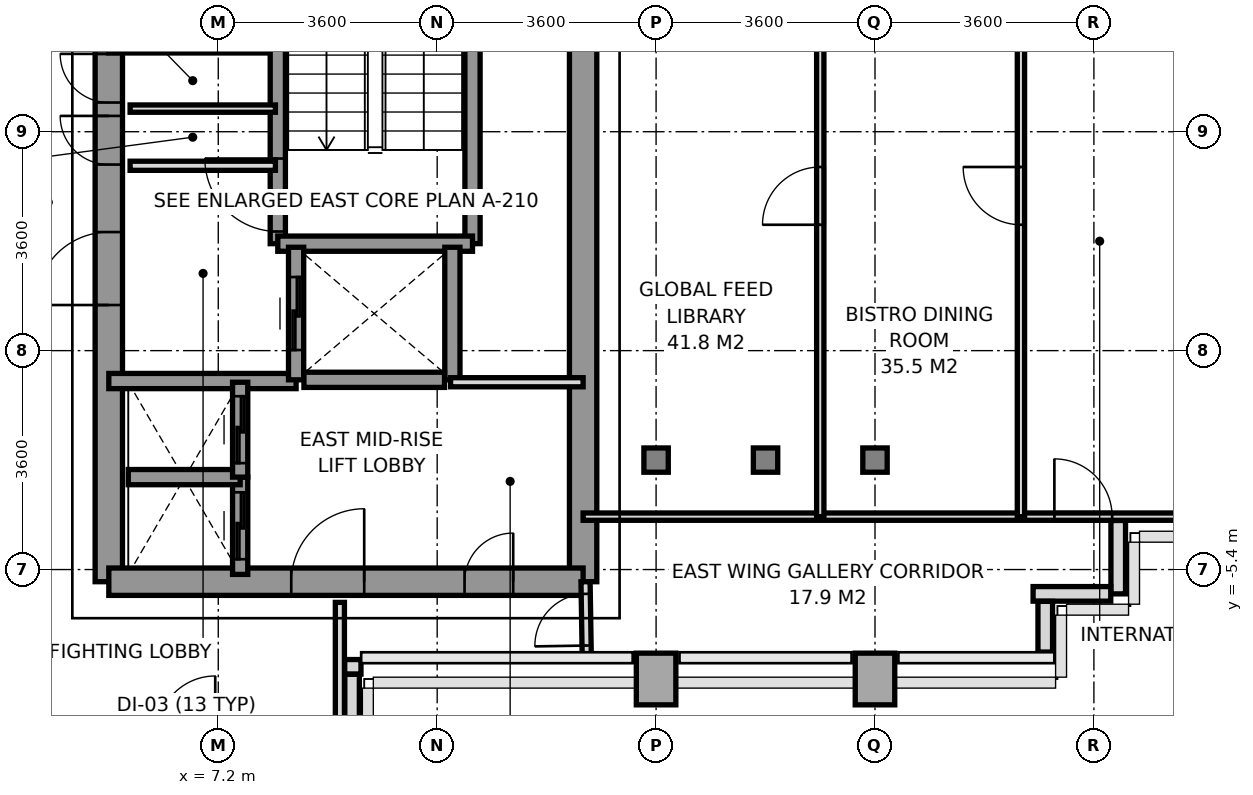
"""IFC4 building model, lengths in metres.
Left out: names, types, materials, properties, quantities, classifications, styles, units other than length and angle.
Written with IfcOpenShell. Run it as: python <this file> out.ifc"""

import sys

from ifc_helpers import new_model, si_unit, direction, frame, frame_2d, origin, origin_2d, place, context, subcontext, project, spatial, rectangle, i_section, extrude, source, transform, mapped, element, fill, save


model = new_model("IFC4")
c1 = context("Model", 3, precision=1e-05, world=origin(), true_north=direction((0.0, 1.0)))
c2 = subcontext(c1, "Body", "Model", "MODEL_VIEW")
j1 = project(units=[si_unit("LENGTHUNIT", "METRE"), si_unit("PLANEANGLEUNIT", "RADIAN")], contexts=[c1])
p1 = place(None, origin())
s1 = spatial("IfcSite", under=j1, at=p1, CompositionType="ELEMENT")
p2 = place(p1, origin())
s2 = spatial("IfcBuilding", under=s1, at=p2, CompositionType="ELEMENT")
p3 = place(p2, frame((0.0, 0.0, 124.4)))
s3 = spatial("IfcBuildingStorey", under=s2, at=p3, CompositionType="ELEMENT", Elevation=124.4)
m1 = source(origin(), c2, "Body", "SweptSolid", [
    extrude(rectangle(XDim=0.65, YDim=0.85, at=origin_2d()), origin(), (0.0, 0.0, 1.0), 3.2),
])
p4 = place(p3, frame((14.4, -7.2, 0.0), z_axis=(0.0, 0.0, 1.0), x_axis=(1.0, 0.0, 0.0)))
e1 = element("IfcColumn", 1, at=p4, inside=s3, PredefinedType="COLUMN", context=c2, shape_type="MappedRepresentation", body=[
    mapped(m1, transform((0.0, 0.0, 0.0), x_axis=(1.0, 0.0, 0.0), y_axis=(0.0, 1.0, 0.0), z_axis=(0.0, 0.0, 1.0), scale=1.0)),
])
m2 = source(origin(), c2, "Body", "SweptSolid", [
    extrude(i_section(OverallWidth=0.401, OverallDepth=0.399, WebThickness=0.02, FlangeThickness=0.032, at=origin_2d()), origin(), (0.0, 0.0, 1.0), 3.2),
])
for number, where, z_axis, x_axis in (
    (2, (14.4, -3.6, 0.0), (0.0, 0.0, 1.0), (1.0, 0.0, 0.0)),
    (3, (16.2, -3.6, 0.0), (0.0, 0.0, 1.0), (1.0, 0.0, 0.0)),
):
    element("IfcColumn", number, at=place(p3, frame(where, z_axis=z_axis, x_axis=x_axis)), inside=s3, PredefinedType="COLUMN", context=c2, shape_type="MappedRepresentation", body=[
        mapped(m2, transform((0.0, 0.0, 0.0), x_axis=(1.0, 0.0, 0.0), y_axis=(0.0, 1.0, 0.0), z_axis=(0.0, 0.0, 1.0), scale=1.0)),
    ])
p5 = place(p3, frame((18.0, -7.2, 0.0), z_axis=(0.0, 0.0, 1.0), x_axis=(1.0, 0.0, 0.0)))
e4 = element("IfcColumn", 4, at=p5, inside=s3, PredefinedType="COLUMN", context=c2, shape_type="MappedRepresentation", body=[
    mapped(m1, transform((0.0, 0.0, 0.0), x_axis=(1.0, 0.0, 0.0), y_axis=(0.0, 1.0, 0.0), z_axis=(0.0, 0.0, 1.0), scale=1.0)),
])
p6 = place(p3, frame((18.0, -3.6, 0.0), z_axis=(0.0, 0.0, 1.0), x_axis=(1.0, 0.0, 0.0)))
e5 = element("IfcColumn", 5, at=p6, inside=s3, PredefinedType="COLUMN", context=c2, shape_type="MappedRepresentation", body=[
    mapped(m2, transform((0.0, 0.0, 0.0), x_axis=(1.0, 0.0, 0.0), y_axis=(0.0, 1.0, 0.0), z_axis=(0.0, 0.0, 1.0), scale=1.0)),
])
p7 = place(p3, frame((22.0, -4.593, 0.0), z_axis=(0.0, 0.0, 1.0), x_axis=(0.0, -1.0, 0.0)))
e6 = element("IfcWall", 6, at=p7, inside=s3, PredefinedType="PARAPET", context=c2, shape_type="SweptSolid", body=[
    extrude(rectangle(XDim=1.207, YDim=0.24, at=frame_2d((0.604, 0.0))), origin(), (0.0, 0.0, 1.0), 1.15),
])
p8 = place(p3, frame((21.877, -5.8, 0.0), z_axis=(0.0, 0.0, 1.0), x_axis=(-1.0, 0.0, 0.0)))
e7 = element("IfcWall", 7, at=p8, inside=s3, PredefinedType="PARAPET", context=c2, shape_type="SweptSolid", body=[
    extrude(rectangle(XDim=1.277, YDim=0.24, at=frame_2d((0.638, 0.0))), origin(), (0.0, 0.0, 1.0), 1.15),
])
p9 = place(p3, frame((20.8, -5.923, 0.0), z_axis=(0.0, 0.0, 1.0), x_axis=(0.0, -1.0, 0.0)))
e8 = element("IfcWall", 8, at=p9, inside=s3, PredefinedType="PARAPET", context=c2, shape_type="SweptSolid", body=[
    extrude(rectangle(XDim=0.834, YDim=0.24, at=frame_2d((0.417, 0.0))), origin(), (0.0, 0.0, 1.0), 1.15),
])
p10 = place(p3, frame((9.547, -7.0, 0.0), z_axis=(0.0, 0.0, 1.0), x_axis=(-1.0, 0.0, 0.0)))
e9 = element("IfcWall", 9, at=p10, inside=s3, PredefinedType="PARAPET", context=c2, shape_type="SweptSolid", body=[
    extrude(rectangle(XDim=0.269, YDim=0.24, at=frame_2d((0.135, 0.0))), origin(), (0.0, 0.0, 1.0), 1.15),
])
p11 = place(p3, frame((9.4, -7.123, 0.0), z_axis=(0.0, 0.0, 1.0), x_axis=(0.0, -1.0, 0.0)))
e10 = element("IfcWall", 10, at=p11, inside=s3, PredefinedType="PARAPET", context=c2, shape_type="SweptSolid", body=[
    extrude(rectangle(XDim=1.349, YDim=0.24, at=frame_2d((0.674, 0.0))), origin(), (0.0, 0.0, 1.0), 1.15),
])
p12 = place(p3, frame((13.2, -5.6, 0.0), z_axis=(0.0, 0.0, 1.0), x_axis=(0.0, 1.0, 0.0)))
e11 = element("IfcWall", 11, at=p12, inside=s3, PredefinedType="SHEAR", context=c2, shape_type="SweptSolid", body=[
    extrude(rectangle(XDim=11.2, YDim=0.45, at=frame_2d((5.6, 0.0))), origin(), (0.0, 0.0, 1.0), 3.2),
])
p13 = place(p3, frame((5.4, -5.6, 0.0), z_axis=(0.0, 0.0, 1.0), x_axis=(0.0, 1.0, 0.0)))
e12 = element("IfcWall", 12, at=p13, inside=s3, PredefinedType="SHEAR", context=c2, shape_type="SweptSolid", body=[
    extrude(rectangle(XDim=12.5, YDim=0.45, at=frame_2d((6.25, 0.0))), origin(), (0.0, 0.0, 1.0), 3.2),
])
p14 = place(p13, frame((4.55, 0.0, 0.0)))
e13 = element("IfcOpeningElement", 13, at=p14, cuts=e12, PredefinedType="OPENING", context=c2, shape_type="SweptSolid", body=[
    extrude(rectangle(XDim=1.2, YDim=2.2, at=frame_2d((0.6, 1.1))), frame((0.0, 0.235, 0.0), z_axis=(0.0, -1.0, 0.0), x_axis=(1.0, 0.0, 0.0)), (0.0, 0.0, 1.0), 0.47),
])
p15 = place(p13, frame((6.86, 0.0, 0.0)))
e14 = element("IfcOpeningElement", 14, at=p15, cuts=e12, PredefinedType="OPENING", context=c2, shape_type="SweptSolid", body=[
    extrude(rectangle(XDim=0.8, YDim=2.1, at=frame_2d((0.4, 1.05))), frame((0.0, 0.235, 0.0), z_axis=(0.0, -1.0, 0.0), x_axis=(1.0, 0.0, 0.0)), (0.0, 0.0, 1.0), 0.47),
])
p16 = place(p13, frame((7.88, 0.0, 0.0)))
e15 = element("IfcOpeningElement", 15, at=p16, cuts=e12, PredefinedType="OPENING", context=c2, shape_type="SweptSolid", body=[
    extrude(rectangle(XDim=0.8, YDim=2.1, at=frame_2d((0.4, 1.05))), frame((0.0, 0.235, 0.0), z_axis=(0.0, -1.0, 0.0), x_axis=(1.0, 0.0, 0.0)), (0.0, 0.0, 1.0), 0.47),
])
p17 = place(p3, frame((5.4, -5.6, 0.0), z_axis=(0.0, 0.0, 1.0), x_axis=(1.0, 0.0, 0.0)))
e16 = element("IfcWall", 16, at=p17, inside=s3, PredefinedType="SHEAR", context=c2, shape_type="SweptSolid", body=[
    extrude(rectangle(XDim=7.8, YDim=0.45, at=frame_2d((3.9, 0.0))), origin(), (0.0, 0.0, 1.0), 3.2),
])
p18 = place(p17, frame((3.0, 0.0, 0.0)))
e17 = element("IfcOpeningElement", 17, at=p18, cuts=e16, PredefinedType="OPENING", context=c2, shape_type="SweptSolid", body=[
    extrude(rectangle(XDim=1.2, YDim=2.2, at=frame_2d((0.6, 1.1))), frame((0.0, 0.235, 0.0), z_axis=(0.0, -1.0, 0.0), x_axis=(1.0, 0.0, 0.0)), (0.0, 0.0, 1.0), 0.47),
])
p19 = place(p17, frame((5.85, 0.0, 0.0)))
e18 = element("IfcOpeningElement", 18, at=p19, cuts=e16, PredefinedType="OPENING", context=c2, shape_type="SweptSolid", body=[
    extrude(rectangle(XDim=0.8, YDim=2.1, at=frame_2d((0.4, 1.05))), frame((0.0, 0.235, 0.0), z_axis=(0.0, -1.0, 0.0), x_axis=(1.0, 0.0, 0.0)), (0.0, 0.0, 1.0), 0.47),
])
p20 = place(p3, frame((5.4, 3.22, 0.0), z_axis=(0.0, 0.0, 1.0), x_axis=(1.0, 0.0, 0.0)))
e19 = element("IfcWall", 19, at=p20, inside=s3, PredefinedType="SOLIDWALL", context=c2, shape_type="SweptSolid", body=[
    extrude(rectangle(XDim=2.78, YDim=0.25, at=frame_2d((1.39, 0.0))), origin(), (0.0, 0.0, 1.0), 3.2),
])
p21 = place(p3, frame((5.4, -2.3, 0.0), z_axis=(0.0, 0.0, 1.0), x_axis=(1.0, 0.0, 0.0)))
e20 = element("IfcWall", 20, at=p21, inside=s3, PredefinedType="SOLIDWALL", context=c2, shape_type="SweptSolid", body=[
    extrude(rectangle(XDim=3.08, YDim=0.25, at=frame_2d((1.54, 0.0))), origin(), (0.0, 0.0, 1.0), 3.2),
])
p22 = place(p3, frame((8.179, -0.041, 0.0), z_axis=(0.0, 0.0, 1.0), x_axis=(0.0, 1.0, 0.0)))
e21 = element("IfcWall", 21, at=p22, inside=s3, PredefinedType="SOLIDWALL", context=c2, shape_type="SweptSolid", body=[
    extrude(rectangle(XDim=6.941, YDim=0.25, at=frame_2d((3.47, 0.0))), origin(), (0.0, 0.0, 1.0), 3.2),
])
p23 = place(p22, frame((0.2, 0.0, 0.0)))
e22 = element("IfcOpeningElement", 22, at=p23, cuts=e21, PredefinedType="OPENING", context=c2, shape_type="SweptSolid", body=[
    extrude(rectangle(XDim=1.2, YDim=2.2, at=frame_2d((0.6, 1.1))), frame((0.0, 0.135, 0.0), z_axis=(0.0, -1.0, 0.0), x_axis=(1.0, 0.0, 0.0)), (0.0, 0.0, 1.0), 0.27),
])
p24 = place(p3, frame((11.381, -0.041, 0.0), z_axis=(0.0, 0.0, 1.0), x_axis=(0.0, 1.0, 0.0)))
e23 = element("IfcWall", 23, at=p24, inside=s3, PredefinedType="SOLIDWALL", context=c2, shape_type="SweptSolid", body=[
    extrude(rectangle(XDim=6.941, YDim=0.25, at=frame_2d((3.47, 0.0))), origin(), (0.0, 0.0, 1.0), 3.2),
])
p25 = place(p3, frame((8.179, -0.041, 0.0), z_axis=(0.0, 0.0, 1.0), x_axis=(1.0, 0.0, 0.0)))
e24 = element("IfcWall", 24, at=p25, inside=s3, PredefinedType="SOLIDWALL", context=c2, shape_type="SweptSolid", body=[
    extrude(rectangle(XDim=3.202, YDim=0.25, at=frame_2d((1.601, 0.0))), origin(), (0.0, 0.0, 1.0), 3.2),
])
p26 = place(p3, frame((8.48, -2.28, 0.0), z_axis=(0.0, 0.0, 1.0), x_axis=(0.0, 1.0, 0.0)))
e25 = element("IfcWall", 25, at=p26, inside=s3, PredefinedType="SOLIDWALL", context=c2, shape_type="SweptSolid", body=[
    extrude(rectangle(XDim=2.18, YDim=0.25, at=frame_2d((1.09, 0.0))), origin(), (0.0, 0.0, 1.0), 3.2),
])
p27 = place(p26, frame((0.49, 0.0, 0.0)))
e26 = element("IfcOpeningElement", 26, at=p27, cuts=e25, PredefinedType="OPENING", context=c2, shape_type="SweptSolid", body=[
    extrude(rectangle(XDim=1.2, YDim=2.2, at=frame_2d((0.6, 1.1))), frame((0.0, 0.135, 0.0), z_axis=(0.0, -1.0, 0.0), x_axis=(1.0, 0.0, 0.0)), (0.0, 0.0, 1.0), 0.27),
])
p28 = place(p3, frame((11.05, -2.28, 0.0), z_axis=(0.0, 0.0, 1.0), x_axis=(0.0, 1.0, 0.0)))
e27 = element("IfcWall", 27, at=p28, inside=s3, PredefinedType="SOLIDWALL", context=c2, shape_type="SweptSolid", body=[
    extrude(rectangle(XDim=2.18, YDim=0.25, at=frame_2d((1.09, 0.0))), origin(), (0.0, 0.0, 1.0), 3.2),
])
p29 = place(p3, frame((8.609, -2.28, 0.0), z_axis=(0.0, 0.0, 1.0), x_axis=(1.0, 0.0, 0.0)))
e28 = element("IfcWall", 28, at=p29, inside=s3, PredefinedType="SOLIDWALL", context=c2, shape_type="SweptSolid", body=[
    extrude(rectangle(XDim=2.312, YDim=0.25, at=frame_2d((1.156, 0.0))), origin(), (0.0, 0.0, 1.0), 3.2),
])
p30 = place(p3, frame((7.56, -5.48, 0.0), z_axis=(0.0, 0.0, 1.0), x_axis=(0.0, 1.0, 0.0)))
e29 = element("IfcWall", 29, at=p30, inside=s3, PredefinedType="SOLIDWALL", context=c2, shape_type="SweptSolid", body=[
    extrude(rectangle(XDim=1.6, YDim=0.25, at=frame_2d((0.8, 0.0))), origin(), (0.0, 0.0, 1.0), 3.2),
])
p31 = place(p30, frame((0.25, 0.0, 0.0)))
e30 = element("IfcOpeningElement", 30, at=p31, cuts=e29, PredefinedType="OPENING", context=c2, shape_type="SweptSolid", body=[
    extrude(rectangle(XDim=1.1, YDim=2.2, at=frame_2d((0.55, 1.1))), frame((0.0, 0.135, 0.0), z_axis=(0.0, -1.0, 0.0), x_axis=(1.0, 0.0, 0.0)), (0.0, 0.0, 1.0), 0.27),
])
p32 = place(p3, frame((5.72, -3.88, 0.0), z_axis=(0.0, 0.0, 1.0), x_axis=(1.0, 0.0, 0.0)))
e31 = element("IfcWall", 31, at=p32, inside=s3, PredefinedType="SOLIDWALL", context=c2, shape_type="SweptSolid", body=[
    extrude(rectangle(XDim=1.84, YDim=0.25, at=frame_2d((0.92, 0.0))), origin(), (0.0, 0.0, 1.0), 3.2),
])
p33 = place(p3, frame((7.56, -3.88, 0.0), z_axis=(0.0, 0.0, 1.0), x_axis=(0.0, 1.0, 0.0)))
e32 = element("IfcWall", 32, at=p33, inside=s3, PredefinedType="SOLIDWALL", context=c2, shape_type="SweptSolid", body=[
    extrude(rectangle(XDim=1.56, YDim=0.25, at=frame_2d((0.78, 0.0))), origin(), (0.0, 0.0, 1.0), 3.2),
])
p34 = place(p33, frame((0.23, 0.0, 0.0)))
e33 = element("IfcOpeningElement", 33, at=p34, cuts=e32, PredefinedType="OPENING", context=c2, shape_type="SweptSolid", body=[
    extrude(rectangle(XDim=1.1, YDim=2.2, at=frame_2d((0.55, 1.1))), frame((0.0, 0.135, 0.0), z_axis=(0.0, -1.0, 0.0), x_axis=(1.0, 0.0, 0.0)), (0.0, 0.0, 1.0), 0.27),
])
p35 = place(p3, frame((5.75, 1.24, 0.0), z_axis=(0.0, 0.0, 1.0), x_axis=(1.0, 0.0, 0.0)))
e34 = element("IfcWall", 34, at=p35, inside=s3, PredefinedType="PARTITIONING", context=c2, shape_type="SweptSolid", body=[
    extrude(rectangle(XDim=2.39, YDim=0.15, at=frame_2d((1.195, 0.0))), origin(), (0.0, 0.0, 1.0), 2.3),
])
p36 = place(p3, frame((5.75, 2.18, 0.0), z_axis=(0.0, 0.0, 1.0), x_axis=(1.0, 0.0, 0.0)))
e35 = element("IfcWall", 35, at=p36, inside=s3, PredefinedType="PARTITIONING", context=c2, shape_type="SweptSolid", body=[
    extrude(rectangle(XDim=2.39, YDim=0.12, at=frame_2d((1.195, 0.0))), origin(), (0.0, 0.0, 1.0), 2.3),
])
p37 = place(p3, frame((11.02, -2.32, 0.0), z_axis=(0.0, 0.0, 1.0), x_axis=(1.0, 0.0, 0.0)))
e36 = element("IfcWall", 36, at=p37, inside=s3, PredefinedType="PARTITIONING", context=c2, shape_type="SweptSolid", body=[
    extrude(rectangle(XDim=2.18, YDim=0.15, at=frame_2d((1.09, 0.0))), origin(), (0.0, 0.0, 1.0), 3.2),
])
p38 = place(p3, frame((9.2, -15.68, 0.0), z_axis=(0.0, 0.0, 1.0), x_axis=(0.0, 1.0, 0.0)))
e37 = element("IfcWall", 37, at=p38, inside=s3, PredefinedType="PARTITIONING", context=c2, shape_type="SweptSolid", body=[
    extrude(rectangle(XDim=9.74, YDim=0.15, at=frame_2d((4.87, 0.0))), origin(), (0.0, 0.0, 1.0), 2.7),
])
p39 = place(p3, frame((13.26, -6.85, 0.0), z_axis=(0.0, 0.0, 1.0), x_axis=(-0.016013571389, 0.999871774545, 0.0)))
e38 = element("IfcWall", 38, at=p39, inside=s3, PredefinedType="PARTITIONING", context=c2, shape_type="SweptSolid", body=[
    extrude(rectangle(XDim=1.25, YDim=0.15, at=frame_2d((0.625, 0.0))), origin(), (0.0, 0.0, 1.0), 3.2),
])
p40 = place(p39, frame((0.2, 0.0, 0.0)))
e39 = element("IfcOpeningElement", 39, at=p40, cuts=e38, PredefinedType="OPENING", context=c2, shape_type="SweptSolid", body=[
    extrude(rectangle(XDim=0.85, YDim=2.1, at=frame_2d((0.425, 1.05))), frame((0.0, 0.085, 0.0), z_axis=(0.0, -1.0, 0.0), x_axis=(1.0, 0.0, 0.0)), (0.0, 0.0, 1.0), 0.17),
])
p41 = place(p3, frame((13.2, -4.53, 0.0), z_axis=(0.0, 0.0, 1.0), x_axis=(1.0, 0.0, 0.0)))
e40 = element("IfcWall", 40, at=p41, inside=s3, PredefinedType="PARTITIONING", context=c2, shape_type="SweptSolid", body=[
    extrude(rectangle(XDim=10.1, YDim=0.12, at=frame_2d((5.05, 0.0))), origin(), (0.0, 0.0, 1.0), 2.76),
])
p42 = place(p41, frame((7.75, 0.0, 0.0)))
e41 = element("IfcOpeningElement", 41, at=p42, cuts=e40, PredefinedType="OPENING", context=c2, shape_type="SweptSolid", body=[
    extrude(rectangle(XDim=0.95, YDim=2.15, at=frame_2d((0.475, 1.075))), frame((0.0, 0.07, 0.0), z_axis=(0.0, -1.0, 0.0), x_axis=(1.0, 0.0, 0.0)), (0.0, 0.0, 1.0), 0.14),
])
p43 = place(p3, frame((17.1, -4.53, 0.0), z_axis=(0.0, 0.0, 1.0), x_axis=(0.0, 1.0, 0.0)))
e42 = element("IfcWall", 42, at=p43, inside=s3, PredefinedType="PARTITIONING", context=c2, shape_type="SweptSolid", body=[
    extrude(rectangle(XDim=11.38, YDim=0.12, at=frame_2d((5.69, 0.0))), origin(), (0.0, 0.0, 1.0), 2.7),
])
p44 = place(p43, frame((4.8, 0.0, 0.0)))
e43 = element("IfcOpeningElement", 43, at=p44, cuts=e42, PredefinedType="OPENING", context=c2, shape_type="SweptSolid", body=[
    extrude(rectangle(XDim=0.95, YDim=2.15, at=frame_2d((0.475, 1.075))), frame((0.0, 0.07, 0.0), z_axis=(0.0, -1.0, 0.0), x_axis=(1.0, 0.0, 0.0)), (0.0, 0.0, 1.0), 0.14),
])
p45 = place(p3, frame((20.4, -4.53, 0.0), z_axis=(0.0, 0.0, 1.0), x_axis=(0.0, 1.0, 0.0)))
e44 = element("IfcWall", 44, at=p45, inside=s3, PredefinedType="PARTITIONING", context=c2, shape_type="SweptSolid", body=[
    extrude(rectangle(XDim=11.38, YDim=0.12, at=frame_2d((5.69, 0.0))), origin(), (0.0, 0.0, 1.0), 2.7),
])
p46 = place(p45, frame((4.8, 0.0, 0.0)))
e45 = element("IfcOpeningElement", 45, at=p46, cuts=e44, PredefinedType="OPENING", context=c2, shape_type="SweptSolid", body=[
    extrude(rectangle(XDim=0.95, YDim=2.15, at=frame_2d((0.475, 1.075))), frame((0.0, 0.07, 0.0), z_axis=(0.0, -1.0, 0.0), x_axis=(1.0, 0.0, 0.0)), (0.0, 0.0, 1.0), 0.14),
])
m3 = source(origin(), c2, "Body", "SweptSolid", [
    extrude(rectangle(XDim=1.2, YDim=2.2, at=frame_2d((0.6, 1.1))), frame((0.0, 0.025, 0.0), z_axis=(0.0, -1.0, 0.0), x_axis=(1.0, 0.0, 0.0)), (0.0, 0.0, 1.0), 0.05),
])
p47 = place(p23, origin())
e46 = element("IfcDoor", 46, at=p47, inside=s3, OperationType="SINGLE_SWING_RIGHT", PredefinedType="DOOR", context=c2, shape_type="MappedRepresentation", body=[
    mapped(m3, transform((0.0, 0.0, 0.0), x_axis=(1.0, 0.0, 0.0), y_axis=(0.0, 1.0, 0.0), z_axis=(0.0, 0.0, 1.0), scale=1.0)),
])
fill(e22, e46)
p48 = place(p14, origin())
e47 = element("IfcDoor", 47, at=p48, inside=s3, OperationType="SINGLE_SWING_LEFT", PredefinedType="DOOR", context=c2, shape_type="MappedRepresentation", body=[
    mapped(m3, transform((0.0, 0.0, 0.0), x_axis=(1.0, 0.0, 0.0), y_axis=(0.0, 1.0, 0.0), z_axis=(0.0, 0.0, 1.0), scale=1.0)),
])
fill(e13, e47)
p49 = place(p18, origin())
e48 = element("IfcDoor", 48, at=p49, inside=s3, OperationType="SINGLE_SWING_RIGHT", PredefinedType="DOOR", context=c2, shape_type="MappedRepresentation", body=[
    mapped(m3, transform((0.0, 0.0, 0.0), x_axis=(1.0, 0.0, 0.0), y_axis=(0.0, 1.0, 0.0), z_axis=(0.0, 0.0, 1.0), scale=1.0)),
])
fill(e17, e48)
m4 = source(origin(), c2, "Body", "SweptSolid", [
    extrude(rectangle(XDim=0.8, YDim=2.1, at=frame_2d((0.4, 1.05))), frame((0.0, 0.025, 0.0), z_axis=(0.0, -1.0, 0.0), x_axis=(1.0, 0.0, 0.0)), (0.0, 0.0, 1.0), 0.05),
])
p50 = place(p15, origin())
e49 = element("IfcDoor", 49, at=p50, inside=s3, OperationType="SINGLE_SWING_RIGHT", PredefinedType="DOOR", context=c2, shape_type="MappedRepresentation", body=[
    mapped(m4, transform((0.0, 0.0, 0.0), x_axis=(1.0, 0.0, 0.0), y_axis=(0.0, 1.0, 0.0), z_axis=(0.0, 0.0, 1.0), scale=1.0)),
])
fill(e14, e49)
p51 = place(p16, origin())
e50 = element("IfcDoor", 50, at=p51, inside=s3, OperationType="SINGLE_SWING_RIGHT", PredefinedType="DOOR", context=c2, shape_type="MappedRepresentation", body=[
    mapped(m4, transform((0.0, 0.0, 0.0), x_axis=(1.0, 0.0, 0.0), y_axis=(0.0, 1.0, 0.0), z_axis=(0.0, 0.0, 1.0), scale=1.0)),
])
fill(e15, e50)
p52 = place(p19, origin())
e51 = element("IfcDoor", 51, at=p52, inside=s3, OperationType="SINGLE_SWING_RIGHT", PredefinedType="DOOR", context=c2, shape_type="MappedRepresentation", body=[
    mapped(m4, transform((0.0, 0.0, 0.0), x_axis=(1.0, 0.0, 0.0), y_axis=(0.0, 1.0, 0.0), z_axis=(0.0, 0.0, 1.0), scale=1.0)),
])
fill(e18, e51)
p53 = place(p27, origin())
e52 = element("IfcDoor", 52, at=p53, inside=s3, OperationType="SLIDING_TO_RIGHT", PredefinedType="DOOR", context=c2, shape_type="MappedRepresentation", body=[
    mapped(m3, transform((0.0, 0.0, 0.0), x_axis=(1.0, 0.0, 0.0), y_axis=(0.0, 1.0, 0.0), z_axis=(0.0, 0.0, 1.0), scale=1.0)),
])
fill(e26, e52)
m5 = source(origin(), c2, "Body", "SweptSolid", [
    extrude(rectangle(XDim=1.1, YDim=2.2, at=frame_2d((0.55, 1.1))), frame((0.0, 0.025, 0.0), z_axis=(0.0, -1.0, 0.0), x_axis=(1.0, 0.0, 0.0)), (0.0, 0.0, 1.0), 0.05),
])
p54 = place(p31, origin())
e53 = element("IfcDoor", 53, at=p54, inside=s3, OperationType="SLIDING_TO_LEFT", PredefinedType="DOOR", context=c2, shape_type="MappedRepresentation", body=[
    mapped(m5, transform((0.0, 0.0, 0.0), x_axis=(1.0, 0.0, 0.0), y_axis=(0.0, 1.0, 0.0), z_axis=(0.0, 0.0, 1.0), scale=1.0)),
])
fill(e30, e53)
p55 = place(p34, origin())
e54 = element("IfcDoor", 54, at=p55, inside=s3, OperationType="SLIDING_TO_LEFT", PredefinedType="DOOR", context=c2, shape_type="MappedRepresentation", body=[
    mapped(m5, transform((0.0, 0.0, 0.0), x_axis=(1.0, 0.0, 0.0), y_axis=(0.0, 1.0, 0.0), z_axis=(0.0, 0.0, 1.0), scale=1.0)),
])
fill(e33, e54)
m6 = source(origin(), c2, "Body", "SweptSolid", [
    extrude(rectangle(XDim=0.85, YDim=2.1, at=frame_2d((0.425, 1.05))), frame((0.0, 0.025, 0.0), z_axis=(0.0, -1.0, 0.0), x_axis=(1.0, 0.0, 0.0)), (0.0, 0.0, 1.0), 0.05),
])
p56 = place(p40, origin())
e55 = element("IfcDoor", 55, at=p56, inside=s3, OperationType="SINGLE_SWING_LEFT", PredefinedType="DOOR", context=c2, shape_type="MappedRepresentation", body=[
    mapped(m6, transform((0.0, 0.0, 0.0), x_axis=(1.0, 0.0, 0.0), y_axis=(0.0, 1.0, 0.0), z_axis=(0.0, 0.0, 1.0), scale=1.0)),
])
fill(e39, e55)
m7 = source(origin(), c2, "Body", "SweptSolid", [
    extrude(rectangle(XDim=0.95, YDim=2.15, at=frame_2d((0.475, 1.075))), frame((0.0, 0.025, 0.0), z_axis=(0.0, -1.0, 0.0), x_axis=(1.0, 0.0, 0.0)), (0.0, 0.0, 1.0), 0.05),
])
p57 = place(p44, origin())
e56 = element("IfcDoor", 56, at=p57, inside=s3, OperationType="SINGLE_SWING_LEFT", PredefinedType="DOOR", context=c2, shape_type="MappedRepresentation", body=[
    mapped(m7, transform((0.0, 0.0, 0.0), x_axis=(1.0, 0.0, 0.0), y_axis=(0.0, 1.0, 0.0), z_axis=(0.0, 0.0, 1.0), scale=1.0)),
])
fill(e43, e56)
p58 = place(p46, origin())
e57 = element("IfcDoor", 57, at=p58, inside=s3, OperationType="SINGLE_SWING_RIGHT", PredefinedType="DOOR", context=c2, shape_type="MappedRepresentation", body=[
    mapped(m7, transform((0.0, 0.0, 0.0), x_axis=(1.0, 0.0, 0.0), y_axis=(0.0, 1.0, 0.0), z_axis=(0.0, 0.0, 1.0), scale=1.0)),
])
fill(e45, e57)
p59 = place(p42, origin())
e58 = element("IfcDoor", 58, at=p59, inside=s3, OperationType="SINGLE_SWING_LEFT", PredefinedType="DOOR", context=c2, shape_type="MappedRepresentation", body=[
    mapped(m7, transform((0.0, 0.0, 0.0), x_axis=(1.0, 0.0, 0.0), y_axis=(0.0, 1.0, 0.0), z_axis=(0.0, 0.0, 1.0), scale=1.0)),
])
fill(e41, e58)
save(model, sys.argv[1])
